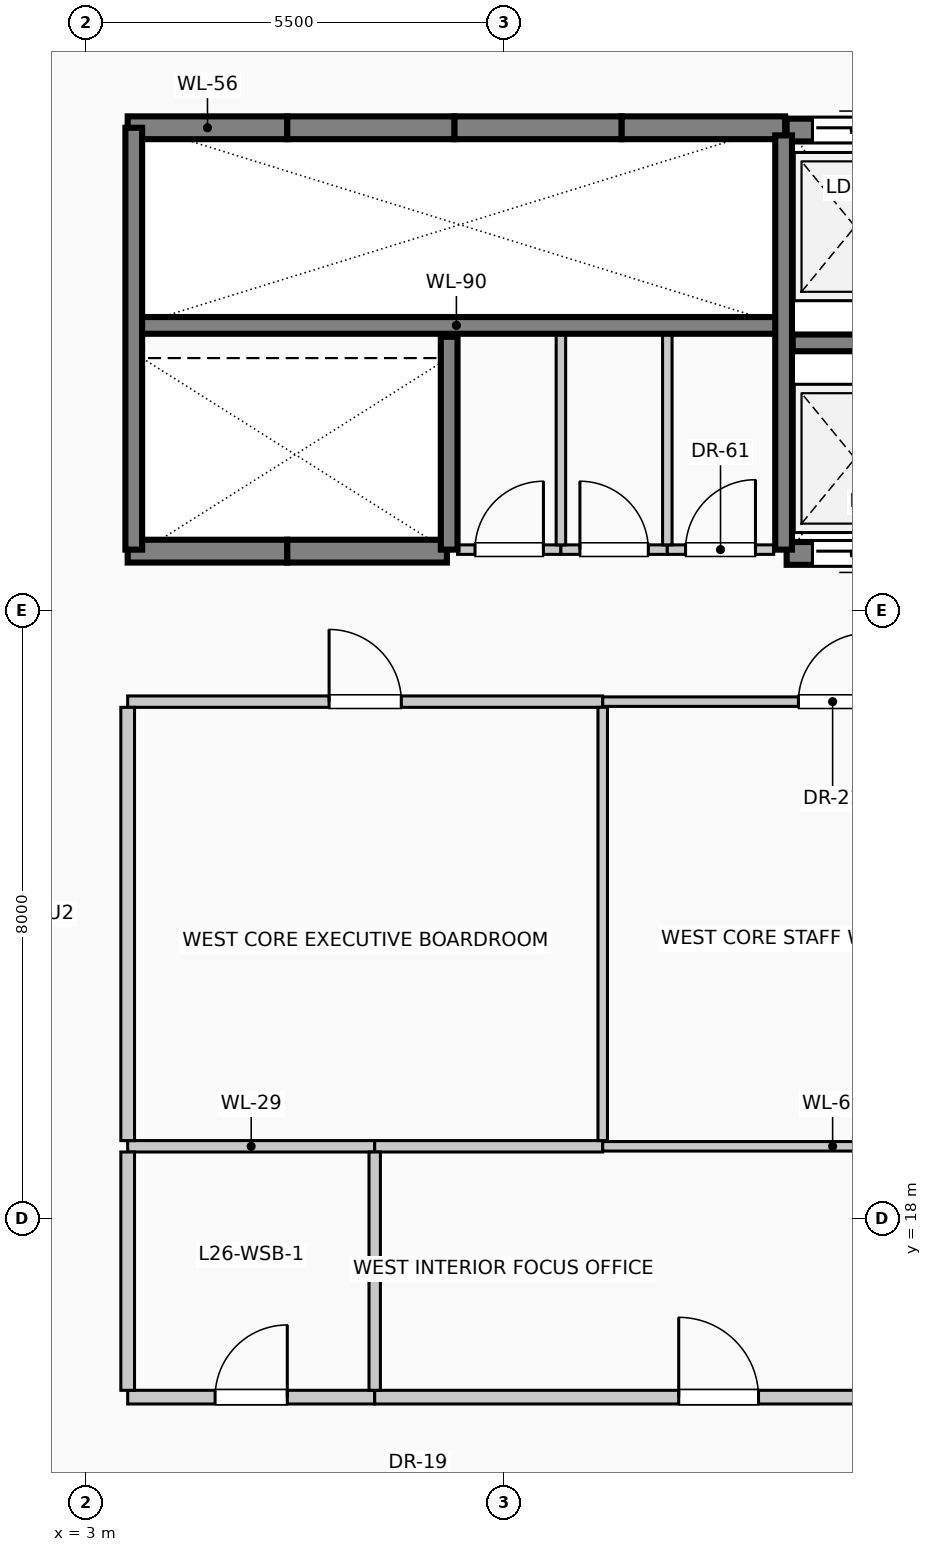
"""IFC4 building model, lengths in metres.
Left out: names, types, materials, properties, quantities, classifications, styles, units other than length and angle.
Written with IfcOpenShell. Run it as: python <this file> out.ifc"""

import sys

from ifc_helpers import new_model, si_unit, direction, frame, frame_2d, origin, place, context, subcontext, project, spatial, rectangle, extrude, element, fill, save


model = new_model("IFC4")
c1 = context("Model", 3, precision=1e-05, world=origin(), true_north=direction((0.0, 1.0)))
c2 = subcontext(c1, "Body", "Model", "MODEL_VIEW")
j1 = project(units=[si_unit("LENGTHUNIT", "METRE"), si_unit("PLANEANGLEUNIT", "RADIAN")], contexts=[c1])
p1 = place(None, origin())
s1 = spatial("IfcSite", under=j1, at=p1, CompositionType="ELEMENT")
p2 = place(p1, origin())
s2 = spatial("IfcBuilding", under=s1, at=p2, CompositionType="ELEMENT")
p3 = place(p2, frame((0.0, 0.0, 108.6)))
s3 = spatial("IfcBuildingStorey", under=s2, at=p3, CompositionType="ELEMENT", Elevation=108.6)
p4 = place(p3, frame((14.0, 26.75, 0.0), z_axis=(0.0, 0.0, 1.0), x_axis=(-1.0, 0.0, 0.0)))
e1 = element("IfcWall", 1, at=p4, inside=s3, PredefinedType="SOLIDWALL", context=c2, shape_type="SweptSolid", body=[
    extrude(rectangle(XDim=1.78, YDim=0.3, at=frame_2d((0.89, 0.0))), origin(), (0.0, 0.0, 1.0), 4.0),
])
p5 = place(p4, frame((0.34, 0.0, 0.0)))
e2 = element("IfcOpeningElement", 2, at=p5, cuts=e1, PredefinedType="OPENING", context=c2, shape_type="SweptSolid", body=[
    extrude(rectangle(XDim=1.1, YDim=2.2, at=frame_2d((0.55, 1.1))), frame((0.0, 0.16, 0.0), z_axis=(0.0, -1.0, 0.0), x_axis=(1.0, 0.0, 0.0)), (0.0, 0.0, 1.0), 0.32),
])
p6 = place(p3, frame((12.22, 32.32, 0.0), z_axis=(0.0, 0.0, 1.0), x_axis=(1.0, 0.0, 0.0)))
e3 = element("IfcWall", 3, at=p6, inside=s3, PredefinedType="SOLIDWALL", context=c2, shape_type="SweptSolid", body=[
    extrude(rectangle(XDim=1.78, YDim=0.3, at=frame_2d((0.89, 0.0))), origin(), (0.0, 0.0, 1.0), 4.0),
])
p7 = place(p6, frame((0.34, 0.0, 0.0)))
e4 = element("IfcOpeningElement", 4, at=p7, cuts=e3, PredefinedType="OPENING", context=c2, shape_type="SweptSolid", body=[
    extrude(rectangle(XDim=1.1, YDim=2.2, at=frame_2d((0.55, 1.1))), frame((0.0, 0.16, 0.0), z_axis=(0.0, -1.0, 0.0), x_axis=(1.0, 0.0, 0.0)), (0.0, 0.0, 1.0), 0.32),
])
p8 = place(p3, frame((3.55, 32.35, 0.0), z_axis=(0.0, 0.0, 1.0), x_axis=(1.0, 0.0, 0.0)))
e5 = element("IfcWall", 5, at=p8, inside=s3, PredefinedType="SOLIDWALL", context=c2, shape_type="SweptSolid", body=[
    extrude(rectangle(XDim=2.1, YDim=0.3, at=frame_2d((1.05, 0.0))), origin(), (0.0, 0.0, 1.0), 4.0),
])
p9 = place(p3, frame((5.65, 32.35, 0.0), z_axis=(0.0, 0.0, 1.0), x_axis=(1.0, 0.0, 0.0)))
e6 = element("IfcWall", 6, at=p9, inside=s3, PredefinedType="SOLIDWALL", context=c2, shape_type="SweptSolid", body=[
    extrude(rectangle(XDim=2.2, YDim=0.3, at=frame_2d((1.1, 0.0))), origin(), (0.0, 0.0, 1.0), 4.0),
])
p10 = place(p3, frame((7.85, 32.35, 0.0), z_axis=(0.0, 0.0, 1.0), x_axis=(1.0, 0.0, 0.0)))
e7 = element("IfcWall", 7, at=p10, inside=s3, PredefinedType="SOLIDWALL", context=c2, shape_type="SweptSolid", body=[
    extrude(rectangle(XDim=2.2, YDim=0.3, at=frame_2d((1.1, 0.0))), origin(), (0.0, 0.0, 1.0), 4.0),
])
p11 = place(p3, frame((10.05, 32.35, 0.0), z_axis=(0.0, 0.0, 1.0), x_axis=(1.0, 0.0, 0.0)))
e8 = element("IfcWall", 8, at=p11, inside=s3, PredefinedType="SOLIDWALL", context=c2, shape_type="SweptSolid", body=[
    extrude(rectangle(XDim=2.15, YDim=0.3, at=frame_2d((1.075, 0.0))), origin(), (0.0, 0.0, 1.0), 4.0),
])
p12 = place(p3, frame((5.65, 26.78, 0.0), z_axis=(0.0, 0.0, 1.0), x_axis=(-1.0, 0.0, 0.0)))
e9 = element("IfcWall", 9, at=p12, inside=s3, PredefinedType="SOLIDWALL", context=c2, shape_type="SweptSolid", body=[
    extrude(rectangle(XDim=2.1, YDim=0.3, at=frame_2d((1.05, 0.0))), origin(), (0.0, 0.0, 1.0), 4.0),
])
p13 = place(p3, frame((7.75, 26.78, 0.0), z_axis=(0.0, 0.0, 1.0), x_axis=(-1.0, 0.0, 0.0)))
e10 = element("IfcWall", 10, at=p13, inside=s3, PredefinedType="SOLIDWALL", context=c2, shape_type="SweptSolid", body=[
    extrude(rectangle(XDim=2.1, YDim=0.3, at=frame_2d((1.05, 0.0))), origin(), (0.0, 0.0, 1.0), 4.0),
])
p14 = place(p3, frame((3.55, 29.75, 0.0), z_axis=(0.0, 0.0, 1.0), x_axis=(1.0, 0.0, 0.0)))
e11 = element("IfcWall", 11, at=p14, inside=s3, PredefinedType="SOLIDWALL", context=c2, shape_type="SweptSolid", body=[
    extrude(rectangle(XDim=8.65, YDim=0.22, at=frame_2d((4.325, 0.0))), origin(), (0.0, 0.0, 1.0), 4.0),
])
p15 = place(p3, frame((3.63, 26.8, 0.0), z_axis=(0.0, 0.0, 1.0), x_axis=(0.0, 1.0, 0.0)))
e12 = element("IfcWall", 12, at=p15, inside=s3, PredefinedType="SOLIDWALL", context=c2, shape_type="SweptSolid", body=[
    extrude(rectangle(XDim=5.55, YDim=0.22, at=frame_2d((2.775, 0.0))), origin(), (0.0, 0.0, 1.0), 4.0),
])
p16 = place(p3, frame((7.78, 26.8, 0.0), z_axis=(0.0, 0.0, 1.0), x_axis=(0.0, 1.0, 0.0)))
e13 = element("IfcWall", 13, at=p16, inside=s3, PredefinedType="SOLIDWALL", context=c2, shape_type="SweptSolid", body=[
    extrude(rectangle(XDim=2.8, YDim=0.22, at=frame_2d((1.4, 0.0))), origin(), (0.0, 0.0, 1.0), 4.0),
])
p17 = place(p3, frame((12.18, 26.8, 0.0), z_axis=(0.0, 0.0, 1.0), x_axis=(0.0, 1.0, 0.0)))
e14 = element("IfcWall", 14, at=p17, inside=s3, PredefinedType="SOLIDWALL", context=c2, shape_type="SweptSolid", body=[
    extrude(rectangle(XDim=5.45, YDim=0.22, at=frame_2d((2.725, 0.0))), origin(), (0.0, 0.0, 1.0), 4.0),
])
p18 = place(p3, frame((12.3, 29.52, 0.0), z_axis=(0.0, 0.0, 1.0), x_axis=(1.0, 0.0, 0.0)))
e15 = element("IfcWall", 15, at=p18, inside=s3, PredefinedType="SOLIDWALL", context=c2, shape_type="SweptSolid", body=[
    extrude(rectangle(XDim=3.4, YDim=0.22, at=frame_2d((1.7, 0.0))), origin(), (0.0, 0.0, 1.0), 4.0),
])
p19 = place(p3, frame((3.55, 15.65, 0.0), z_axis=(0.0, 0.0, 1.0), x_axis=(1.0, 0.0, 0.0)))
e16 = element("IfcWall", 16, at=p19, inside=s3, PredefinedType="PARTITIONING", context=c2, shape_type="SweptSolid", body=[
    extrude(rectangle(XDim=3.25, YDim=0.18, at=frame_2d((1.625, 0.0))), origin(), (0.0, 0.0, 1.0), 3.725),
])
p20 = place(p19, frame((1.15, 0.0, 0.0)))
e17 = element("IfcOpeningElement", 17, at=p20, cuts=e16, PredefinedType="OPENING", context=c2, shape_type="SweptSolid", body=[
    extrude(rectangle(XDim=0.95, YDim=2.15, at=frame_2d((0.475, 1.075))), frame((0.0, 0.1, 0.0), z_axis=(0.0, -1.0, 0.0), x_axis=(1.0, 0.0, 0.0)), (0.0, 0.0, 1.0), 0.2),
])
p21 = place(p3, frame((6.8, 15.65, 0.0), z_axis=(0.0, 0.0, 1.0), x_axis=(1.0, 0.0, 0.0)))
e18 = element("IfcWall", 18, at=p21, inside=s3, PredefinedType="PARTITIONING", context=c2, shape_type="SweptSolid", body=[
    extrude(rectangle(XDim=9.05, YDim=0.18, at=frame_2d((4.525, 0.0))), origin(), (0.0, 0.0, 1.0), 3.725),
])
p22 = place(p21, frame((4.0, 0.0, 0.0)))
e19 = element("IfcOpeningElement", 19, at=p22, cuts=e18, PredefinedType="OPENING", context=c2, shape_type="SweptSolid", body=[
    extrude(rectangle(XDim=1.05, YDim=2.15, at=frame_2d((0.525, 1.075))), frame((0.0, 0.1, 0.0), z_axis=(0.0, -1.0, 0.0), x_axis=(1.0, 0.0, 0.0)), (0.0, 0.0, 1.0), 0.2),
])
p23 = place(p3, frame((3.55, 18.95, 0.0), z_axis=(0.0, 0.0, 1.0), x_axis=(1.0, 0.0, 0.0)))
e20 = element("IfcWall", 20, at=p23, inside=s3, PredefinedType="PARTITIONING", context=c2, shape_type="SweptSolid", body=[
    extrude(rectangle(XDim=3.25, YDim=0.15, at=frame_2d((1.625, 0.0))), origin(), (0.0, 0.0, 1.0), 3.725),
])
p24 = place(p3, frame((6.8, 18.95, 0.0), z_axis=(0.0, 0.0, 1.0), x_axis=(1.0, 0.0, 0.0)))
e21 = element("IfcWall", 21, at=p24, inside=s3, PredefinedType="PARTITIONING", context=c2, shape_type="SweptSolid", body=[
    extrude(rectangle(XDim=3.0, YDim=0.15, at=frame_2d((1.5, 0.0))), origin(), (0.0, 0.0, 1.0), 3.725),
])
p25 = place(p3, frame((9.8, 18.95, 0.0), z_axis=(0.0, 0.0, 1.0), x_axis=(1.0, 0.0, 0.0)))
e22 = element("IfcWall", 22, at=p25, inside=s3, PredefinedType="PARTITIONING", context=c2, shape_type="SweptSolid", body=[
    extrude(rectangle(XDim=6.05, YDim=0.125, at=frame_2d((3.025, 0.0))), origin(), (0.0, 0.0, 1.0), 3.725),
])
p26 = place(p3, frame((3.55, 24.8, 0.0), z_axis=(0.0, 0.0, 1.0), x_axis=(1.0, 0.0, 0.0)))
e23 = element("IfcWall", 23, at=p26, inside=s3, PredefinedType="PARTITIONING", context=c2, shape_type="SweptSolid", body=[
    extrude(rectangle(XDim=6.25, YDim=0.15, at=frame_2d((3.125, 0.0))), origin(), (0.0, 0.0, 1.0), 3.725),
])
p27 = place(p26, frame((2.65, 0.0, 0.0)))
e24 = element("IfcOpeningElement", 24, at=p27, cuts=e23, PredefinedType="OPENING", context=c2, shape_type="SweptSolid", body=[
    extrude(rectangle(XDim=0.95, YDim=2.15, at=frame_2d((0.475, 1.075))), frame((0.0, 0.085, 0.0), z_axis=(0.0, -1.0, 0.0), x_axis=(1.0, 0.0, 0.0)), (0.0, 0.0, 1.0), 0.17),
])
p28 = place(p3, frame((9.8, 24.8, 0.0), z_axis=(0.0, 0.0, 1.0), x_axis=(1.0, 0.0, 0.0)))
e25 = element("IfcWall", 25, at=p28, inside=s3, PredefinedType="PARTITIONING", context=c2, shape_type="SweptSolid", body=[
    extrude(rectangle(XDim=6.05, YDim=0.125, at=frame_2d((3.025, 0.0))), origin(), (0.0, 0.0, 1.0), 3.725),
])
p29 = place(p28, frame((2.575, 0.0, 0.0)))
e26 = element("IfcOpeningElement", 26, at=p29, cuts=e25, PredefinedType="OPENING", context=c2, shape_type="SweptSolid", body=[
    extrude(rectangle(XDim=0.9, YDim=2.1, at=frame_2d((0.45, 1.05))), frame((0.0, 0.073, 0.0), z_axis=(0.0, -1.0, 0.0), x_axis=(1.0, 0.0, 0.0)), (0.0, 0.0, 1.0), 0.145),
])
p30 = place(p3, frame((7.89, 26.8, 0.0), z_axis=(0.0, 0.0, 1.0), x_axis=(1.0, 0.0, 0.0)))
e27 = element("IfcWall", 27, at=p30, inside=s3, PredefinedType="PARTITIONING", context=c2, shape_type="SweptSolid", body=[
    extrude(rectangle(XDim=1.36, YDim=0.125, at=frame_2d((0.68, 0.0))), origin(), (0.0, 0.0, 1.0), 3.725),
])
p31 = place(p30, frame((0.23, 0.0, 0.0)))
e28 = element("IfcOpeningElement", 28, at=p31, cuts=e27, PredefinedType="OPENING", context=c2, shape_type="SweptSolid", body=[
    extrude(rectangle(XDim=0.9, YDim=2.1, at=frame_2d((0.45, 1.05))), frame((0.0, 0.073, 0.0), z_axis=(0.0, -1.0, 0.0), x_axis=(1.0, 0.0, 0.0)), (0.0, 0.0, 1.0), 0.145),
])
p32 = place(p3, frame((9.25, 26.8, 0.0), z_axis=(0.0, 0.0, 1.0), x_axis=(1.0, 0.0, 0.0)))
e29 = element("IfcWall", 29, at=p32, inside=s3, PredefinedType="PARTITIONING", context=c2, shape_type="SweptSolid", body=[
    extrude(rectangle(XDim=1.4, YDim=0.125, at=frame_2d((0.7, 0.0))), origin(), (0.0, 0.0, 1.0), 3.725),
])
p33 = place(p32, frame((0.25, 0.0, 0.0)))
e30 = element("IfcOpeningElement", 30, at=p33, cuts=e29, PredefinedType="OPENING", context=c2, shape_type="SweptSolid", body=[
    extrude(rectangle(XDim=0.9, YDim=2.1, at=frame_2d((0.45, 1.05))), frame((0.0, 0.073, 0.0), z_axis=(0.0, -1.0, 0.0), x_axis=(1.0, 0.0, 0.0)), (0.0, 0.0, 1.0), 0.145),
])
p34 = place(p3, frame((10.65, 26.8, 0.0), z_axis=(0.0, 0.0, 1.0), x_axis=(1.0, 0.0, 0.0)))
e31 = element("IfcWall", 31, at=p34, inside=s3, PredefinedType="PARTITIONING", context=c2, shape_type="SweptSolid", body=[
    extrude(rectangle(XDim=1.4, YDim=0.125, at=frame_2d((0.7, 0.0))), origin(), (0.0, 0.0, 1.0), 3.725),
])
p35 = place(p34, frame((0.24, 0.0, 0.0)))
e32 = element("IfcOpeningElement", 32, at=p35, cuts=e31, PredefinedType="OPENING", context=c2, shape_type="SweptSolid", body=[
    extrude(rectangle(XDim=0.92, YDim=2.1, at=frame_2d((0.46, 1.05))), frame((0.0, 0.073, 0.0), z_axis=(0.0, -1.0, 0.0), x_axis=(1.0, 0.0, 0.0)), (0.0, 0.0, 1.0), 0.145),
])
p36 = place(p3, frame((3.55, 15.74, 0.0), z_axis=(0.0, 0.0, 1.0), x_axis=(0.0, 1.0, 0.0)))
e33 = element("IfcWall", 33, at=p36, inside=s3, PredefinedType="PARTITIONING", context=c2, shape_type="SweptSolid", body=[
    extrude(rectangle(XDim=3.135, YDim=0.18, at=frame_2d((1.567, 0.0))), origin(), (0.0, 0.0, 1.0), 3.725),
])
p37 = place(p3, frame((3.55, 19.025, 0.0), z_axis=(0.0, 0.0, 1.0), x_axis=(0.0, 1.0, 0.0)))
e34 = element("IfcWall", 34, at=p37, inside=s3, PredefinedType="PARTITIONING", context=c2, shape_type="SweptSolid", body=[
    extrude(rectangle(XDim=5.7, YDim=0.18, at=frame_2d((2.85, 0.0))), origin(), (0.0, 0.0, 1.0), 3.725),
])
p38 = place(p3, frame((6.8, 15.74, 0.0), z_axis=(0.0, 0.0, 1.0), x_axis=(0.0, 1.0, 0.0)))
e35 = element("IfcWall", 35, at=p38, inside=s3, PredefinedType="PARTITIONING", context=c2, shape_type="SweptSolid", body=[
    extrude(rectangle(XDim=3.135, YDim=0.15, at=frame_2d((1.567, 0.0))), origin(), (0.0, 0.0, 1.0), 3.725),
])
p39 = place(p3, frame((9.25, 26.863, 0.0), z_axis=(0.0, 0.0, 1.0), x_axis=(0.0, 1.0, 0.0)))
e36 = element("IfcWall", 36, at=p39, inside=s3, PredefinedType="PARTITIONING", context=c2, shape_type="SweptSolid", body=[
    extrude(rectangle(XDim=2.777, YDim=0.125, at=frame_2d((1.389, 0.0))), origin(), (0.0, 0.0, 1.0), 3.725),
])
p40 = place(p3, frame((9.8, 19.025, 0.0), z_axis=(0.0, 0.0, 1.0), x_axis=(0.0, 1.0, 0.0)))
e37 = element("IfcWall", 37, at=p40, inside=s3, PredefinedType="PARTITIONING", context=c2, shape_type="SweptSolid", body=[
    extrude(rectangle(XDim=5.7, YDim=0.125, at=frame_2d((2.85, 0.0))), origin(), (0.0, 0.0, 1.0), 3.725),
])
p41 = place(p3, frame((10.65, 26.863, 0.0), z_axis=(0.0, 0.0, 1.0), x_axis=(0.0, 1.0, 0.0)))
e38 = element("IfcWall", 38, at=p41, inside=s3, PredefinedType="PARTITIONING", context=c2, shape_type="SweptSolid", body=[
    extrude(rectangle(XDim=2.777, YDim=0.125, at=frame_2d((1.389, 0.0))), origin(), (0.0, 0.0, 1.0), 3.725),
])
p42 = place(p5, origin())
e39 = element("IfcDoor", 39, at=p42, inside=s3, OperationType="SLIDING_TO_LEFT", PredefinedType="DOOR", context=c2, shape_type="SweptSolid", body=[
    extrude(rectangle(XDim=1.1, YDim=2.2, at=frame_2d((0.55, 1.1))), frame((0.0, 0.025, 0.0), z_axis=(0.0, -1.0, 0.0), x_axis=(1.0, 0.0, 0.0)), (0.0, 0.0, 1.0), 0.05),
])
fill(e2, e39)
p43 = place(p7, origin())
e40 = element("IfcDoor", 40, at=p43, inside=s3, OperationType="SLIDING_TO_LEFT", PredefinedType="DOOR", context=c2, shape_type="SweptSolid", body=[
    extrude(rectangle(XDim=1.1, YDim=2.2, at=frame_2d((0.55, 1.1))), frame((0.0, 0.025, 0.0), z_axis=(0.0, -1.0, 0.0), x_axis=(1.0, 0.0, 0.0)), (0.0, 0.0, 1.0), 0.05),
])
fill(e4, e40)
p44 = place(p20, origin())
e41 = element("IfcDoor", 41, at=p44, inside=s3, OperationType="SINGLE_SWING_RIGHT", PredefinedType="DOOR", context=c2, shape_type="SweptSolid", body=[
    extrude(rectangle(XDim=0.95, YDim=2.15, at=frame_2d((0.475, 1.075))), frame((0.0, 0.025, 0.0), z_axis=(0.0, -1.0, 0.0), x_axis=(1.0, 0.0, 0.0)), (0.0, 0.0, 1.0), 0.05),
])
fill(e17, e41)
p45 = place(p22, origin())
e42 = element("IfcDoor", 42, at=p45, inside=s3, OperationType="SINGLE_SWING_LEFT", PredefinedType="DOOR", context=c2, shape_type="SweptSolid", body=[
    extrude(rectangle(XDim=1.05, YDim=2.15, at=frame_2d((0.525, 1.075))), frame((0.0, 0.025, 0.0), z_axis=(0.0, -1.0, 0.0), x_axis=(1.0, 0.0, 0.0)), (0.0, 0.0, 1.0), 0.05),
])
fill(e19, e42)
p46 = place(p27, origin())
e43 = element("IfcDoor", 43, at=p46, inside=s3, OperationType="SINGLE_SWING_LEFT", PredefinedType="DOOR", context=c2, shape_type="SweptSolid", body=[
    extrude(rectangle(XDim=0.95, YDim=2.15, at=frame_2d((0.475, 1.075))), frame((0.0, 0.025, 0.0), z_axis=(0.0, -1.0, 0.0), x_axis=(1.0, 0.0, 0.0)), (0.0, 0.0, 1.0), 0.05),
])
fill(e24, e43)
p47 = place(p29, origin())
e44 = element("IfcDoor", 44, at=p47, inside=s3, OperationType="SINGLE_SWING_RIGHT", PredefinedType="DOOR", context=c2, shape_type="SweptSolid", body=[
    extrude(rectangle(XDim=0.9, YDim=2.1, at=frame_2d((0.45, 1.05))), frame((0.0, 0.025, 0.0), z_axis=(0.0, -1.0, 0.0), x_axis=(1.0, 0.0, 0.0)), (0.0, 0.0, 1.0), 0.05),
])
fill(e26, e44)
p48 = place(p31, origin())
e45 = element("IfcDoor", 45, at=p48, inside=s3, OperationType="SINGLE_SWING_RIGHT", PredefinedType="DOOR", context=c2, shape_type="SweptSolid", body=[
    extrude(rectangle(XDim=0.9, YDim=2.1, at=frame_2d((0.45, 1.05))), frame((0.0, 0.025, 0.0), z_axis=(0.0, -1.0, 0.0), x_axis=(1.0, 0.0, 0.0)), (0.0, 0.0, 1.0), 0.05),
])
fill(e28, e45)
p49 = place(p33, origin())
e46 = element("IfcDoor", 46, at=p49, inside=s3, OperationType="SINGLE_SWING_LEFT", PredefinedType="DOOR", context=c2, shape_type="SweptSolid", body=[
    extrude(rectangle(XDim=0.9, YDim=2.1, at=frame_2d((0.45, 1.05))), frame((0.0, 0.025, 0.0), z_axis=(0.0, -1.0, 0.0), x_axis=(1.0, 0.0, 0.0)), (0.0, 0.0, 1.0), 0.05),
])
fill(e30, e46)
p50 = place(p35, origin())
e47 = element("IfcDoor", 47, at=p50, inside=s3, OperationType="SINGLE_SWING_RIGHT", PredefinedType="DOOR", context=c2, shape_type="SweptSolid", body=[
    extrude(rectangle(XDim=0.92, YDim=2.1, at=frame_2d((0.46, 1.05))), frame((0.0, 0.025, 0.0), z_axis=(0.0, -1.0, 0.0), x_axis=(1.0, 0.0, 0.0)), (0.0, 0.0, 1.0), 0.05),
])
fill(e32, e47)
save(model, sys.argv[1])
